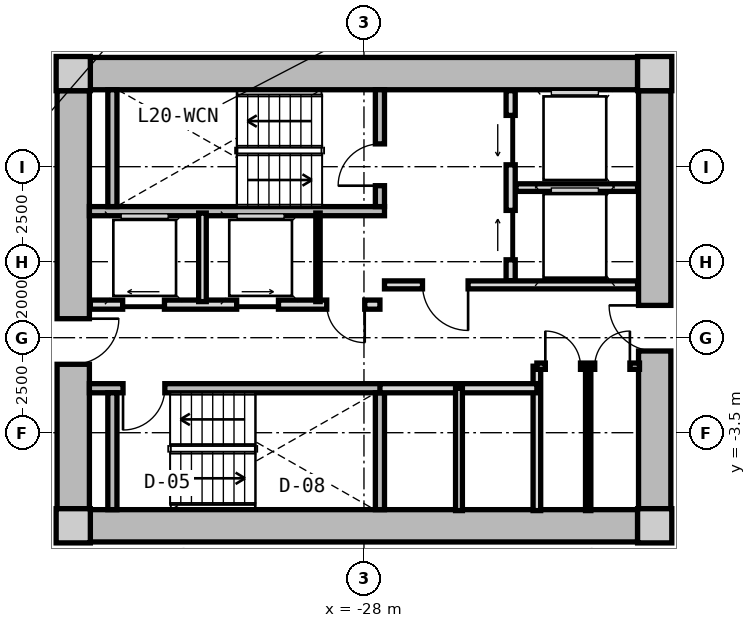
"""IFC4 building model, lengths in metres.
Left out: names, types, materials, properties, quantities, classifications, styles, units other than length and angle.
Written with IfcOpenShell. Run it as: python <this file> out.ifc"""

import sys

from ifc_helpers import new_model, si_unit, direction, frame, frame_2d, origin, origin_2d, place, context, subcontext, project, spatial, rectangle, extrude, source, transform, mapped, element, fill, save


model = new_model("IFC4")
c1 = context("Model", 3, precision=1e-05, world=origin(), true_north=direction((0.0, 1.0)))
c2 = subcontext(c1, "Body", "Model", "MODEL_VIEW")
j1 = project(units=[si_unit("LENGTHUNIT", "METRE"), si_unit("PLANEANGLEUNIT", "RADIAN")], contexts=[c1])
p1 = place(None, origin())
s1 = spatial("IfcSite", under=j1, at=p1, CompositionType="ELEMENT")
p2 = place(p1, origin())
s2 = spatial("IfcBuilding", under=s1, at=p2, CompositionType="ELEMENT")
p3 = place(p2, frame((0.0, 0.0, 67.35)))
s3 = spatial("IfcBuildingStorey", under=s2, at=p3, CompositionType="ELEMENT", Elevation=67.35)
m1 = source(origin(), c2, "Body", "SweptSolid", [
    extrude(rectangle(XDim=0.9, YDim=0.9, at=origin_2d()), origin(), (0.0, 0.0, 1.0), 3.05),
])
for number, where, z_axis, x_axis in (
    (1, (-35.65, -5.95, 0.0), (0.0, 0.0, 1.0), (1.0, 0.0, 0.0)),
    (2, (-20.35, -5.95, 0.0), (0.0, 0.0, 1.0), (1.0, 0.0, 0.0)),
    (3, (-20.35, 5.95, 0.0), (0.0, 0.0, 1.0), (1.0, 0.0, 0.0)),
    (4, (-35.65, 5.95, 0.0), (0.0, 0.0, 1.0), (1.0, 0.0, 0.0)),
):
    element("IfcColumn", number, at=place(p3, frame(where, z_axis=z_axis, x_axis=x_axis)), inside=s3, PredefinedType="COLUMN", context=c2, shape_type="MappedRepresentation", body=[
        mapped(m1, transform((0.0, 0.0, 0.0), x_axis=(1.0, 0.0, 0.0), y_axis=(0.0, 1.0, 0.0), z_axis=(0.0, 0.0, 1.0), scale=1.0)),
    ])
m2 = source(origin(), c2, "Body", "SweptSolid", [
    extrude(rectangle(XDim=14.4, YDim=0.85, at=frame_2d((7.2, 0.0))), origin(), (0.0, 0.0, 1.0), 2.79),
])
for number, where, z_axis, x_axis in (
    (5, (-35.2, 5.95, 0.0), (0.0, 0.0, 1.0), (1.0, 0.0, 0.0)),
    (6, (-20.8, -5.95, 0.0), (0.0, 0.0, 1.0), (-1.0, 0.0, 0.0)),
):
    element("IfcWall", number, at=place(p3, frame(where, z_axis=z_axis, x_axis=x_axis)), inside=s3, PredefinedType="SHEAR", context=c2, shape_type="MappedRepresentation", body=[
        mapped(m2, transform((0.0, 0.0, 0.0), x_axis=(1.0, 0.0, 0.0), y_axis=(0.0, 1.0, 0.0), z_axis=(0.0, 0.0, 1.0), scale=1.0)),
    ])
m3 = source(origin(), c2, "Body", "SweptSolid", [
    extrude(rectangle(XDim=11.0, YDim=0.85, at=frame_2d((5.5, 0.0))), origin(), (0.0, 0.0, 1.0), 2.79),
])
p4 = place(p3, frame((-35.65, -5.5, 0.0), z_axis=(0.0, 0.0, 1.0), x_axis=(0.0, 1.0, 0.0)))
e7 = element("IfcWall", 7, at=p4, inside=s3, PredefinedType="SHEAR", context=c2, shape_type="MappedRepresentation", body=[
    mapped(m3, transform((0.0, 0.0, 0.0), x_axis=(1.0, 0.0, 0.0), y_axis=(0.0, 1.0, 0.0), z_axis=(0.0, 0.0, 1.0), scale=1.0)),
])
p5 = place(p4, frame((3.8, 0.0, 0.0)))
e8 = element("IfcOpeningElement", 8, at=p5, cuts=e7, PredefinedType="OPENING", context=c2, shape_type="SweptSolid", body=[
    extrude(rectangle(XDim=1.2, YDim=2.15, at=frame_2d((0.6, 1.075))), frame((0.0, 0.435, 0.0), z_axis=(0.0, -1.0, 0.0), x_axis=(1.0, 0.0, 0.0)), (0.0, 0.0, 1.0), 0.87),
])
p6 = place(p3, frame((-20.35, 5.5, 0.0), z_axis=(0.0, 0.0, 1.0), x_axis=(0.0, -1.0, 0.0)))
e9 = element("IfcWall", 9, at=p6, inside=s3, PredefinedType="SHEAR", context=c2, shape_type="MappedRepresentation", body=[
    mapped(m3, transform((0.0, 0.0, 0.0), x_axis=(1.0, 0.0, 0.0), y_axis=(0.0, 1.0, 0.0), z_axis=(0.0, 0.0, 1.0), scale=1.0)),
])
p7 = place(p6, frame((5.65, 0.0, 0.0)))
e10 = element("IfcOpeningElement", 10, at=p7, cuts=e9, PredefinedType="OPENING", context=c2, shape_type="SweptSolid", body=[
    extrude(rectangle(XDim=1.2, YDim=2.15, at=frame_2d((0.6, 1.075))), frame((0.0, 0.435, 0.0), z_axis=(0.0, -1.0, 0.0), x_axis=(1.0, 0.0, 0.0)), (0.0, 0.0, 1.0), 0.87),
])
m4 = source(origin(), c2, "Body", "SweptSolid", [
    extrude(rectangle(XDim=7.765, YDim=0.24, at=frame_2d((3.883, 0.0))), origin(), (0.0, 0.0, 1.0), 2.79),
])
p8 = place(p3, frame((-35.225, 2.33, 0.0), z_axis=(0.0, 0.0, 1.0), x_axis=(1.0, 0.0, 0.0)))
e11 = element("IfcWall", 11, at=p8, inside=s3, PredefinedType="PARTITIONING", context=c2, shape_type="MappedRepresentation", body=[
    mapped(m4, transform((0.0, 0.0, 0.0), x_axis=(1.0, 0.0, 0.0), y_axis=(0.0, 1.0, 0.0), z_axis=(0.0, 0.0, 1.0), scale=1.0)),
])
m5 = source(origin(), c2, "Body", "SweptSolid", [
    extrude(rectangle(XDim=3.075, YDim=0.24, at=frame_2d((1.538, 0.0))), origin(), (0.0, 0.0, 1.0), 2.79),
])
p9 = place(p3, frame((-34.62, 2.45, 0.0), z_axis=(0.0, 0.0, 1.0), x_axis=(0.0, 1.0, 0.0)))
e12 = element("IfcWall", 12, at=p9, inside=s3, PredefinedType="PARTITIONING", context=c2, shape_type="MappedRepresentation", body=[
    mapped(m5, transform((0.0, 0.0, 0.0), x_axis=(1.0, 0.0, 0.0), y_axis=(0.0, 1.0, 0.0), z_axis=(0.0, 0.0, 1.0), scale=1.0)),
])
p10 = place(p3, frame((-27.58, 2.45, 0.0), z_axis=(0.0, 0.0, 1.0), x_axis=(0.0, 1.0, 0.0)))
e13 = element("IfcWall", 13, at=p10, inside=s3, PredefinedType="PARTITIONING", context=c2, shape_type="MappedRepresentation", body=[
    mapped(m5, transform((0.0, 0.0, 0.0), x_axis=(1.0, 0.0, 0.0), y_axis=(0.0, 1.0, 0.0), z_axis=(0.0, 0.0, 1.0), scale=1.0)),
])
p11 = place(p10, frame((0.55, 0.0, 0.0)))
e14 = element("IfcOpeningElement", 14, at=p11, cuts=e13, PredefinedType="OPENING", context=c2, shape_type="SweptSolid", body=[
    extrude(rectangle(XDim=1.1, YDim=2.15, at=frame_2d((0.55, 1.075))), frame((0.0, 0.13, 0.0), z_axis=(0.0, -1.0, 0.0), x_axis=(1.0, 0.0, 0.0)), (0.0, 0.0, 1.0), 0.26),
])
p12 = place(p3, frame((-35.225, -2.33, 0.0), z_axis=(0.0, 0.0, 1.0), x_axis=(1.0, 0.0, 0.0)))
e15 = element("IfcWall", 15, at=p12, inside=s3, PredefinedType="PARTITIONING", context=c2, shape_type="MappedRepresentation", body=[
    mapped(m4, transform((0.0, 0.0, 0.0), x_axis=(1.0, 0.0, 0.0), y_axis=(0.0, 1.0, 0.0), z_axis=(0.0, 0.0, 1.0), scale=1.0)),
])
p13 = place(p12, frame((0.885, 0.0, 0.0)))
e16 = element("IfcOpeningElement", 16, at=p13, cuts=e15, PredefinedType="OPENING", context=c2, shape_type="SweptSolid", body=[
    extrude(rectangle(XDim=1.1, YDim=2.15, at=frame_2d((0.55, 1.075))), frame((0.0, 0.13, 0.0), z_axis=(0.0, -1.0, 0.0), x_axis=(1.0, 0.0, 0.0)), (0.0, 0.0, 1.0), 0.26),
])
for number, where, z_axis, x_axis in (
    (17, (-34.62, -5.525, 0.0), (0.0, 0.0, 1.0), (0.0, 1.0, 0.0)),
    (18, (-27.58, -5.525, 0.0), (0.0, 0.0, 1.0), (0.0, 1.0, 0.0)),
):
    element("IfcWall", number, at=place(p3, frame(where, z_axis=z_axis, x_axis=x_axis)), inside=s3, PredefinedType="PARTITIONING", context=c2, shape_type="MappedRepresentation", body=[
        mapped(m5, transform((0.0, 0.0, 0.0), x_axis=(1.0, 0.0, 0.0), y_axis=(0.0, 1.0, 0.0), z_axis=(0.0, 0.0, 1.0), scale=1.0)),
    ])
m6 = source(origin(), c2, "Body", "SweptSolid", [
    extrude(rectangle(XDim=5.0, YDim=0.24, at=frame_2d((2.5, 0.0))), origin(), (0.0, 0.0, 1.0), 2.775),
])
p14 = place(p3, frame((-24.14, 0.5, 0.0), z_axis=(0.0, 0.0, 1.0), x_axis=(0.0, 1.0, 0.0)))
e19 = element("IfcWall", 19, at=p14, inside=s3, PredefinedType="PARTITIONING", context=c2, shape_type="MappedRepresentation", body=[
    mapped(m6, transform((0.0, 0.0, 0.0), x_axis=(1.0, 0.0, 0.0), y_axis=(0.0, 1.0, 0.0), z_axis=(0.0, 0.0, 1.0), scale=1.0)),
])
p15 = place(p14, frame((3.05, 0.0, 0.0)))
e20 = element("IfcOpeningElement", 20, at=p15, cuts=e19, PredefinedType="OPENING", context=c2, shape_type="SweptSolid", body=[
    extrude(rectangle(XDim=1.3, YDim=2.2, at=frame_2d((0.65, 1.1))), frame((0.0, 0.13, 0.0), z_axis=(0.0, -1.0, 0.0), x_axis=(1.0, 0.0, 0.0)), (0.0, 0.0, 1.0), 0.26),
])
p16 = place(p14, frame((0.55, 0.0, 0.0)))
e21 = element("IfcOpeningElement", 21, at=p16, cuts=e19, PredefinedType="OPENING", context=c2, shape_type="SweptSolid", body=[
    extrude(rectangle(XDim=1.3, YDim=2.2, at=frame_2d((0.65, 1.1))), frame((0.0, 0.13, 0.0), z_axis=(0.0, -1.0, 0.0), x_axis=(1.0, 0.0, 0.0)), (0.0, 0.0, 1.0), 0.26),
])
m7 = source(origin(), c2, "Body", "SweptSolid", [
    extrude(rectangle(XDim=3.2, YDim=0.2, at=frame_2d((1.6, 0.0))), origin(), (0.0, 0.0, 1.0), 2.775),
])
p17 = place(p3, frame((-24.0, 2.95, 0.0), z_axis=(0.0, 0.0, 1.0), x_axis=(1.0, 0.0, 0.0)))
e22 = element("IfcWall", 22, at=p17, inside=s3, PredefinedType="PARTITIONING", context=c2, shape_type="MappedRepresentation", body=[
    mapped(m7, transform((0.0, 0.0, 0.0), x_axis=(1.0, 0.0, 0.0), y_axis=(0.0, 1.0, 0.0), z_axis=(0.0, 0.0, 1.0), scale=1.0)),
])
m8 = source(origin(), c2, "Body", "SweptSolid", [
    extrude(rectangle(XDim=6.66, YDim=0.21, at=frame_2d((3.33, 0.0))), origin(), (0.0, 0.0, 1.0), 2.775),
])
p18 = place(p3, frame((-27.46, 0.39, 0.0), z_axis=(0.0, 0.0, 1.0), x_axis=(1.0, 0.0, 0.0)))
e23 = element("IfcWall", 23, at=p18, inside=s3, PredefinedType="PARTITIONING", context=c2, shape_type="MappedRepresentation", body=[
    mapped(m8, transform((0.0, 0.0, 0.0), x_axis=(1.0, 0.0, 0.0), y_axis=(0.0, 1.0, 0.0), z_axis=(0.0, 0.0, 1.0), scale=1.0)),
])
p19 = place(p18, frame((1.0, 0.0, 0.0)))
e24 = element("IfcOpeningElement", 24, at=p19, cuts=e23, PredefinedType="OPENING", context=c2, shape_type="SweptSolid", body=[
    extrude(rectangle(XDim=1.2, YDim=2.15, at=frame_2d((0.6, 1.075))), frame((0.0, 0.115, 0.0), z_axis=(0.0, -1.0, 0.0), x_axis=(1.0, 0.0, 0.0)), (0.0, 0.0, 1.0), 0.23),
])
m9 = source(origin(), c2, "Body", "SweptSolid", [
    extrude(rectangle(XDim=7.62, YDim=0.24, at=frame_2d((3.81, 0.0))), origin(), (0.0, 0.0, 1.0), 2.775),
])
p20 = place(p3, frame((-35.2, -0.13, 0.0), z_axis=(0.0, 0.0, 1.0), x_axis=(1.0, 0.0, 0.0)))
e25 = element("IfcWall", 25, at=p20, inside=s3, PredefinedType="PARTITIONING", context=c2, shape_type="MappedRepresentation", body=[
    mapped(m9, transform((0.0, 0.0, 0.0), x_axis=(1.0, 0.0, 0.0), y_axis=(0.0, 1.0, 0.0), z_axis=(0.0, 0.0, 1.0), scale=1.0)),
])
p21 = place(p20, frame((6.22, 0.0, 0.0)))
e26 = element("IfcOpeningElement", 26, at=p21, cuts=e25, PredefinedType="OPENING", context=c2, shape_type="SweptSolid", body=[
    extrude(rectangle(XDim=1.0, YDim=2.1, at=frame_2d((0.5, 1.05))), frame((0.0, 0.13, 0.0), z_axis=(0.0, -1.0, 0.0), x_axis=(1.0, 0.0, 0.0)), (0.0, 0.0, 1.0), 0.26),
])
p22 = place(p20, frame((0.85, 0.0, 0.0)))
e27 = element("IfcOpeningElement", 27, at=p22, cuts=e25, PredefinedType="OPENING", context=c2, shape_type="SweptSolid", body=[
    extrude(rectangle(XDim=1.1, YDim=2.2, at=frame_2d((0.55, 1.1))), frame((0.0, 0.13, 0.0), z_axis=(0.0, -1.0, 0.0), x_axis=(1.0, 0.0, 0.0)), (0.0, 0.0, 1.0), 0.26),
])
p23 = place(p20, frame((3.85, 0.0, 0.0)))
e28 = element("IfcOpeningElement", 28, at=p23, cuts=e25, PredefinedType="OPENING", context=c2, shape_type="SweptSolid", body=[
    extrude(rectangle(XDim=1.1, YDim=2.2, at=frame_2d((0.55, 1.1))), frame((0.0, 0.13, 0.0), z_axis=(0.0, -1.0, 0.0), x_axis=(1.0, 0.0, 0.0)), (0.0, 0.0, 1.0), 0.26),
])
m10 = source(origin(), c2, "Body", "SweptSolid", [
    extrude(rectangle(XDim=2.33, YDim=0.115, at=frame_2d((1.165, 0.0))), origin(), (0.0, 0.0, 1.0), 2.775),
])
p24 = place(p3, frame((-29.21, -0.05, 0.0), z_axis=(0.0, 0.0, 1.0), x_axis=(0.0, 1.0, 0.0)))
e29 = element("IfcWall", 29, at=p24, inside=s3, PredefinedType="PARTITIONING", context=c2, shape_type="MappedRepresentation", body=[
    mapped(m10, transform((0.0, 0.0, 0.0), x_axis=(1.0, 0.0, 0.0), y_axis=(0.0, 1.0, 0.0), z_axis=(0.0, 0.0, 1.0), scale=1.0)),
])
m11 = source(origin(), c2, "Body", "SweptSolid", [
    extrude(rectangle(XDim=2.33, YDim=0.2, at=frame_2d((1.165, 0.0))), origin(), (0.0, 0.0, 1.0), 2.775),
])
p25 = place(p3, frame((-32.25, -0.05, 0.0), z_axis=(0.0, 0.0, 1.0), x_axis=(0.0, 1.0, 0.0)))
e30 = element("IfcWall", 30, at=p25, inside=s3, PredefinedType="PARTITIONING", context=c2, shape_type="MappedRepresentation", body=[
    mapped(m11, transform((0.0, 0.0, 0.0), x_axis=(1.0, 0.0, 0.0), y_axis=(0.0, 1.0, 0.0), z_axis=(0.0, 0.0, 1.0), scale=1.0)),
])
m12 = source(origin(), c2, "Body", "SweptSolid", [
    extrude(rectangle(XDim=3.8, YDim=0.2, at=frame_2d((1.9, 0.0))), origin(), (0.0, 0.0, 1.0), 2.775),
])
p26 = place(p3, frame((-23.45, -5.55, 0.0), z_axis=(0.0, 0.0, 1.0), x_axis=(0.0, 1.0, 0.0)))
e31 = element("IfcWall", 31, at=p26, inside=s3, PredefinedType="PARTITIONING", context=c2, shape_type="MappedRepresentation", body=[
    mapped(m12, transform((0.0, 0.0, 0.0), x_axis=(1.0, 0.0, 0.0), y_axis=(0.0, 1.0, 0.0), z_axis=(0.0, 0.0, 1.0), scale=1.0)),
])
m13 = source(origin(), c2, "Body", "SweptSolid", [
    extrude(rectangle(XDim=4.13, YDim=0.24, at=frame_2d((2.065, 0.0))), origin(), (0.0, 0.0, 1.0), 2.775),
])
p27 = place(p3, frame((-27.58, -2.33, 0.0), z_axis=(0.0, 0.0, 1.0), x_axis=(1.0, 0.0, 0.0)))
e32 = element("IfcWall", 32, at=p27, inside=s3, PredefinedType="PARTITIONING", context=c2, shape_type="MappedRepresentation", body=[
    mapped(m13, transform((0.0, 0.0, 0.0), x_axis=(1.0, 0.0, 0.0), y_axis=(0.0, 1.0, 0.0), z_axis=(0.0, 0.0, 1.0), scale=1.0)),
])
m14 = source(origin(), c2, "Body", "SweptSolid", [
    extrude(rectangle(XDim=3.22, YDim=0.18, at=frame_2d((1.61, 0.0))), origin(), (0.0, 0.0, 1.0), 2.775),
])
p28 = place(p3, frame((-25.5, -5.55, 0.0), z_axis=(0.0, 0.0, 1.0), x_axis=(0.0, 1.0, 0.0)))
e33 = element("IfcWall", 33, at=p28, inside=s3, PredefinedType="PARTITIONING", context=c2, shape_type="MappedRepresentation", body=[
    mapped(m14, transform((0.0, 0.0, 0.0), x_axis=(1.0, 0.0, 0.0), y_axis=(0.0, 1.0, 0.0), z_axis=(0.0, 0.0, 1.0), scale=1.0)),
])
m15 = source(origin(), c2, "Body", "SweptSolid", [
    extrude(rectangle(XDim=2.7, YDim=0.165, at=frame_2d((1.35, 0.0))), origin(), (0.0, 0.0, 1.0), 2.775),
])
p29 = place(p3, frame((-23.45, -1.75, 0.0), z_axis=(0.0, 0.0, 1.0), x_axis=(1.0, 0.0, 0.0)))
e34 = element("IfcWall", 34, at=p29, inside=s3, PredefinedType="PARTITIONING", context=c2, shape_type="MappedRepresentation", body=[
    mapped(m15, transform((0.0, 0.0, 0.0), x_axis=(1.0, 0.0, 0.0), y_axis=(0.0, 1.0, 0.0), z_axis=(0.0, 0.0, 1.0), scale=1.0)),
])
p30 = place(p29, frame((0.222, 0.0, 0.0)))
e35 = element("IfcOpeningElement", 35, at=p30, cuts=e34, PredefinedType="OPENING", context=c2, shape_type="SweptSolid", body=[
    extrude(rectangle(XDim=0.925, YDim=2.1, at=frame_2d((0.462, 1.05))), frame((0.0, 0.093, 0.0), z_axis=(0.0, -1.0, 0.0), x_axis=(1.0, 0.0, 0.0)), (0.0, 0.0, 1.0), 0.185),
])
p31 = place(p29, frame((1.522, 0.0, 0.0)))
e36 = element("IfcOpeningElement", 36, at=p31, cuts=e34, PredefinedType="OPENING", context=c2, shape_type="SweptSolid", body=[
    extrude(rectangle(XDim=0.925, YDim=2.1, at=frame_2d((0.462, 1.05))), frame((0.0, 0.093, 0.0), z_axis=(0.0, -1.0, 0.0), x_axis=(1.0, 0.0, 0.0)), (0.0, 0.0, 1.0), 0.185),
])
m16 = source(origin(), c2, "Body", "SweptSolid", [
    extrude(rectangle(XDim=3.8, YDim=0.14, at=frame_2d((1.9, 0.0))), origin(), (0.0, 0.0, 1.0), 2.775),
])
p32 = place(p3, frame((-22.1, -5.55, 0.0), z_axis=(0.0, 0.0, 1.0), x_axis=(0.0, 1.0, 0.0)))
e37 = element("IfcWall", 37, at=p32, inside=s3, PredefinedType="PARTITIONING", context=c2, shape_type="MappedRepresentation", body=[
    mapped(m16, transform((0.0, 0.0, 0.0), x_axis=(1.0, 0.0, 0.0), y_axis=(0.0, 1.0, 0.0), z_axis=(0.0, 0.0, 1.0), scale=1.0)),
])
m17 = source(origin(), c2, "Body", "SweptSolid", [
    extrude(rectangle(XDim=1.1, YDim=2.15, at=frame_2d((0.55, 1.075))), frame((0.0, 0.025, 0.0), z_axis=(0.0, -1.0, 0.0), x_axis=(1.0, 0.0, 0.0)), (0.0, 0.0, 1.0), 0.05),
])
p33 = place(p11, origin())
e38 = element("IfcDoor", 38, at=p33, inside=s3, OperationType="SINGLE_SWING_LEFT", PredefinedType="DOOR", context=c2, shape_type="MappedRepresentation", body=[
    mapped(m17, transform((0.0, 0.0, 0.0), x_axis=(1.0, 0.0, 0.0), y_axis=(0.0, 1.0, 0.0), z_axis=(0.0, 0.0, 1.0), scale=1.0)),
])
fill(e14, e38)
p34 = place(p13, frame((1.1, 0.0, 0.0), z_axis=(0.0, 0.0, 1.0), x_axis=(-1.0, 0.0, 0.0)))
e39 = element("IfcDoor", 39, at=p34, inside=s3, OperationType="SINGLE_SWING_RIGHT", PredefinedType="DOOR", context=c2, shape_type="MappedRepresentation", body=[
    mapped(m17, transform((0.0, 0.0, 0.0), x_axis=(1.0, 0.0, 0.0), y_axis=(0.0, 1.0, 0.0), z_axis=(0.0, 0.0, 1.0), scale=1.0)),
])
fill(e16, e39)
m18 = source(origin(), c2, "Body", "SweptSolid", [
    extrude(rectangle(XDim=1.3, YDim=2.2, at=frame_2d((0.65, 1.1))), frame((0.0, 0.025, 0.0), z_axis=(0.0, -1.0, 0.0), x_axis=(1.0, 0.0, 0.0)), (0.0, 0.0, 1.0), 0.05),
])
p35 = place(p15, origin())
e40 = element("IfcDoor", 40, at=p35, inside=s3, OperationType="SLIDING_TO_LEFT", PredefinedType="DOOR", context=c2, shape_type="MappedRepresentation", body=[
    mapped(m18, transform((0.0, 0.0, 0.0), x_axis=(1.0, 0.0, 0.0), y_axis=(0.0, 1.0, 0.0), z_axis=(0.0, 0.0, 1.0), scale=1.0)),
])
fill(e20, e40)
p36 = place(p16, origin())
e41 = element("IfcDoor", 41, at=p36, inside=s3, OperationType="SLIDING_TO_RIGHT", PredefinedType="DOOR", context=c2, shape_type="MappedRepresentation", body=[
    mapped(m18, transform((0.0, 0.0, 0.0), x_axis=(1.0, 0.0, 0.0), y_axis=(0.0, 1.0, 0.0), z_axis=(0.0, 0.0, 1.0), scale=1.0)),
])
fill(e21, e41)
m19 = source(origin(), c2, "Body", "SweptSolid", [
    extrude(rectangle(XDim=1.2, YDim=2.15, at=frame_2d((0.6, 1.075))), frame((0.0, 0.025, 0.0), z_axis=(0.0, -1.0, 0.0), x_axis=(1.0, 0.0, 0.0)), (0.0, 0.0, 1.0), 0.05),
])
p37 = place(p19, frame((1.2, 0.0, 0.0), z_axis=(0.0, 0.0, 1.0), x_axis=(-1.0, 0.0, 0.0)))
e42 = element("IfcDoor", 42, at=p37, inside=s3, OperationType="SINGLE_SWING_LEFT", PredefinedType="DOOR", context=c2, shape_type="MappedRepresentation", body=[
    mapped(m19, transform((0.0, 0.0, 0.0), x_axis=(1.0, 0.0, 0.0), y_axis=(0.0, 1.0, 0.0), z_axis=(0.0, 0.0, 1.0), scale=1.0)),
])
fill(e24, e42)
p38 = place(p5, frame((1.2, 0.0, 0.0), z_axis=(0.0, 0.0, 1.0), x_axis=(-1.0, 0.0, 0.0)))
e43 = element("IfcDoor", 43, at=p38, inside=s3, OperationType="SINGLE_SWING_LEFT", PredefinedType="DOOR", context=c2, shape_type="MappedRepresentation", body=[
    mapped(m19, transform((0.0, 0.0, 0.0), x_axis=(1.0, 0.0, 0.0), y_axis=(0.0, 1.0, 0.0), z_axis=(0.0, 0.0, 1.0), scale=1.0)),
])
fill(e8, e43)
p39 = place(p7, frame((1.2, 0.0, 0.0), z_axis=(0.0, 0.0, 1.0), x_axis=(-1.0, 0.0, 0.0)))
e44 = element("IfcDoor", 44, at=p39, inside=s3, OperationType="SINGLE_SWING_RIGHT", PredefinedType="DOOR", context=c2, shape_type="MappedRepresentation", body=[
    mapped(m19, transform((0.0, 0.0, 0.0), x_axis=(1.0, 0.0, 0.0), y_axis=(0.0, 1.0, 0.0), z_axis=(0.0, 0.0, 1.0), scale=1.0)),
])
fill(e10, e44)
m20 = source(origin(), c2, "Body", "SweptSolid", [
    extrude(rectangle(XDim=1.0, YDim=2.1, at=frame_2d((0.5, 1.05))), frame((0.0, 0.025, 0.0), z_axis=(0.0, -1.0, 0.0), x_axis=(1.0, 0.0, 0.0)), (0.0, 0.0, 1.0), 0.05),
])
p40 = place(p21, frame((1.0, 0.0, 0.0), z_axis=(0.0, 0.0, 1.0), x_axis=(-1.0, 0.0, 0.0)))
e45 = element("IfcDoor", 45, at=p40, inside=s3, OperationType="SINGLE_SWING_LEFT", PredefinedType="DOOR", context=c2, shape_type="MappedRepresentation", body=[
    mapped(m20, transform((0.0, 0.0, 0.0), x_axis=(1.0, 0.0, 0.0), y_axis=(0.0, 1.0, 0.0), z_axis=(0.0, 0.0, 1.0), scale=1.0)),
])
fill(e26, e45)
m21 = source(origin(), c2, "Body", "SweptSolid", [
    extrude(rectangle(XDim=1.1, YDim=2.2, at=frame_2d((0.55, 1.1))), frame((0.0, 0.025, 0.0), z_axis=(0.0, -1.0, 0.0), x_axis=(1.0, 0.0, 0.0)), (0.0, 0.0, 1.0), 0.05),
])
p41 = place(p22, origin())
e46 = element("IfcDoor", 46, at=p41, inside=s3, OperationType="SLIDING_TO_LEFT", PredefinedType="DOOR", context=c2, shape_type="MappedRepresentation", body=[
    mapped(m21, transform((0.0, 0.0, 0.0), x_axis=(1.0, 0.0, 0.0), y_axis=(0.0, 1.0, 0.0), z_axis=(0.0, 0.0, 1.0), scale=1.0)),
])
fill(e27, e46)
p42 = place(p23, origin())
e47 = element("IfcDoor", 47, at=p42, inside=s3, OperationType="SLIDING_TO_RIGHT", PredefinedType="DOOR", context=c2, shape_type="MappedRepresentation", body=[
    mapped(m21, transform((0.0, 0.0, 0.0), x_axis=(1.0, 0.0, 0.0), y_axis=(0.0, 1.0, 0.0), z_axis=(0.0, 0.0, 1.0), scale=1.0)),
])
fill(e28, e47)
m22 = source(origin(), c2, "Body", "SweptSolid", [
    extrude(rectangle(XDim=0.925, YDim=2.1, at=frame_2d((0.462, 1.05))), frame((0.0, 0.025, 0.0), z_axis=(0.0, -1.0, 0.0), x_axis=(1.0, 0.0, 0.0)), (0.0, 0.0, 1.0), 0.05),
])
p43 = place(p30, origin())
e48 = element("IfcDoor", 48, at=p43, inside=s3, OperationType="SINGLE_SWING_LEFT", PredefinedType="DOOR", context=c2, shape_type="MappedRepresentation", body=[
    mapped(m22, transform((0.0, 0.0, 0.0), x_axis=(1.0, 0.0, 0.0), y_axis=(0.0, 1.0, 0.0), z_axis=(0.0, 0.0, 1.0), scale=1.0)),
])
fill(e35, e48)
p44 = place(p31, origin())
e49 = element("IfcDoor", 49, at=p44, inside=s3, OperationType="SINGLE_SWING_RIGHT", PredefinedType="DOOR", context=c2, shape_type="MappedRepresentation", body=[
    mapped(m22, transform((0.0, 0.0, 0.0), x_axis=(1.0, 0.0, 0.0), y_axis=(0.0, 1.0, 0.0), z_axis=(0.0, 0.0, 1.0), scale=1.0)),
])
fill(e36, e49)
save(model, sys.argv[1])
